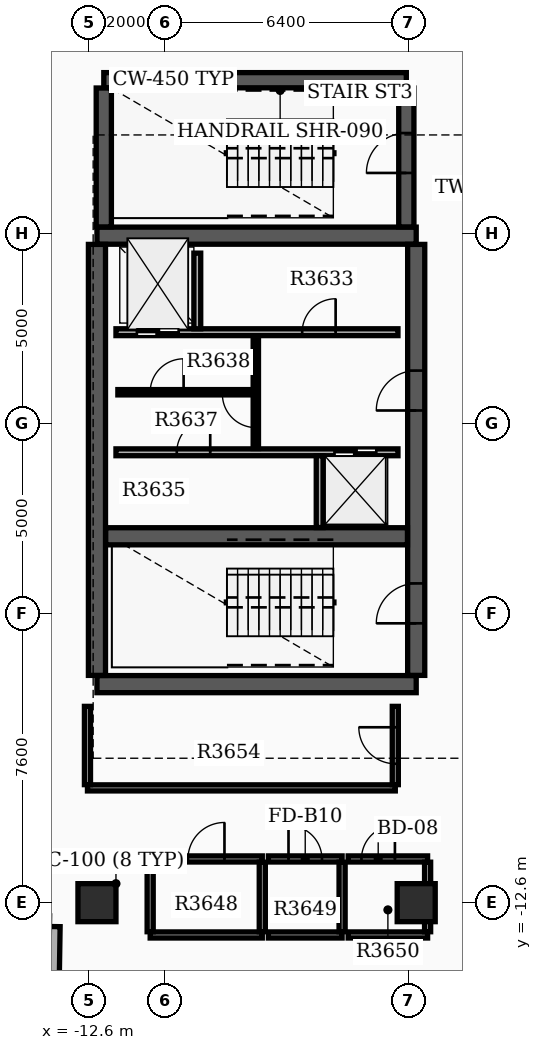
"""IFC4 building model, lengths in metres.
Left out: names, types, materials, properties, quantities, classifications, styles, units other than length and angle.
Written with IfcOpenShell. Run it as: python <this file> out.ifc"""

import sys

from ifc_helpers import new_model, si_unit, direction, frame, frame_2d, origin, origin_2d, place, context, subcontext, project, spatial, rectangle, extrude, element, fill, save


model = new_model("IFC4")
c1 = context("Model", 3, precision=1e-05, world=origin(), true_north=direction((0.0, 1.0)))
c2 = subcontext(c1, "Body", "Model", "MODEL_VIEW")
j1 = project(units=[si_unit("LENGTHUNIT", "METRE"), si_unit("PLANEANGLEUNIT", "RADIAN")], contexts=[c1])
p1 = place(None, origin())
s1 = spatial("IfcSite", under=j1, at=p1, CompositionType="ELEMENT")
p2 = place(p1, origin())
s2 = spatial("IfcBuilding", under=s1, at=p2, CompositionType="ELEMENT")
p3 = place(p2, frame((0.0, 0.0, 228.6)))
s3 = spatial("IfcBuildingStorey", under=s2, at=p3, CompositionType="ELEMENT", Elevation=228.6)
for number, where, z_axis, x_axis in (
    (1, (-12.4, -6.85, 0.0), (0.0, 0.0, 1.0), (1.0, 0.0, 0.0)),
    (2, (-12.4, 4.95, 0.0), (0.0, 0.0, 1.0), (1.0, 0.0, 0.0)),
):
    element("IfcWall", number, at=place(p3, frame(where, z_axis=z_axis, x_axis=x_axis)), inside=s3, PredefinedType="SHEAR", context=c2, shape_type="SweptSolid", body=[
        extrude(rectangle(XDim=8.4, YDim=0.45, at=frame_2d((4.2, 0.0))), origin(), (0.0, 0.0, 1.0), 3.7),
    ])
p4 = place(p3, frame((-12.4, -6.62, 0.0), z_axis=(0.0, 0.0, 1.0), x_axis=(0.0, 1.0, 0.0)))
e3 = element("IfcWall", 3, at=p4, inside=s3, PredefinedType="SHEAR", context=c2, shape_type="SweptSolid", body=[
    extrude(rectangle(XDim=11.34, YDim=0.45, at=frame_2d((5.67, 0.0))), origin(), (0.0, 0.0, 1.0), 3.7),
])
p5 = place(p3, frame((-4.0, -6.62, 0.0), z_axis=(0.0, 0.0, 1.0), x_axis=(0.0, 1.0, 0.0)))
e4 = element("IfcWall", 4, at=p5, inside=s3, PredefinedType="SHEAR", context=c2, shape_type="SweptSolid", body=[
    extrude(rectangle(XDim=11.34, YDim=0.45, at=frame_2d((5.67, 0.0))), origin(), (0.0, 0.0, 1.0), 3.7),
])
p6 = place(p5, frame((1.37, 0.0, 0.0)))
e5 = element("IfcOpeningElement", 5, at=p6, cuts=e4, PredefinedType="OPENING", context=c2, shape_type="SweptSolid", body=[
    extrude(rectangle(XDim=1.05, YDim=2.15, at=frame_2d((0.525, 1.075))), frame((0.0, 0.235, 0.0), z_axis=(0.0, -1.0, 0.0), x_axis=(1.0, 0.0, 0.0)), (0.0, 0.0, 1.0), 0.47),
])
p7 = place(p5, frame((6.97, 0.0, 0.0)))
e6 = element("IfcOpeningElement", 6, at=p7, cuts=e4, PredefinedType="OPENING", context=c2, shape_type="SweptSolid", body=[
    extrude(rectangle(XDim=1.05, YDim=2.15, at=frame_2d((0.525, 1.075))), frame((0.0, 0.235, 0.0), z_axis=(0.0, -1.0, 0.0), x_axis=(1.0, 0.0, 0.0)), (0.0, 0.0, 1.0), 0.47),
])
p8 = place(p3, frame((-12.17, -2.96, 0.0), z_axis=(0.0, 0.0, 1.0), x_axis=(1.0, 0.0, 0.0)))
e7 = element("IfcWall", 7, at=p8, inside=s3, PredefinedType="SHEAR", context=c2, shape_type="SweptSolid", body=[
    extrude(rectangle(XDim=7.94, YDim=0.45, at=frame_2d((3.97, 0.0))), origin(), (0.0, 0.0, 1.0), 3.7),
])
p9 = place(p3, frame((-12.22, 9.04, 0.0), z_axis=(0.0, 0.0, 1.0), x_axis=(1.0, 0.0, 0.0)))
e8 = element("IfcWall", 8, at=p9, inside=s3, PredefinedType="SHEAR", context=c2, shape_type="SweptSolid", body=[
    extrude(rectangle(XDim=7.96, YDim=0.4, at=frame_2d((3.98, 0.0))), origin(), (0.0, 0.0, 1.0), 3.7),
])
p10 = place(p3, frame((-12.22, 5.18, 0.0), z_axis=(0.0, 0.0, 1.0), x_axis=(0.0, 1.0, 0.0)))
e9 = element("IfcWall", 9, at=p10, inside=s3, PredefinedType="SHEAR", context=c2, shape_type="SweptSolid", body=[
    extrude(rectangle(XDim=3.655, YDim=0.4, at=frame_2d((1.828, 0.0))), origin(), (0.0, 0.0, 1.0), 3.7),
])
p11 = place(p3, frame((-4.26, 5.18, 0.0), z_axis=(0.0, 0.0, 1.0), x_axis=(0.0, 1.0, 0.0)))
e10 = element("IfcWall", 10, at=p11, inside=s3, PredefinedType="SHEAR", context=c2, shape_type="SweptSolid", body=[
    extrude(rectangle(XDim=3.655, YDim=0.4, at=frame_2d((1.828, 0.0))), origin(), (0.0, 0.0, 1.0), 3.7),
])
p12 = place(p11, frame((1.42, 0.0, 0.0)))
e11 = element("IfcOpeningElement", 11, at=p12, cuts=e10, PredefinedType="OPENING", context=c2, shape_type="SweptSolid", body=[
    extrude(rectangle(XDim=1.05, YDim=2.15, at=frame_2d((0.525, 1.075))), frame((0.0, 0.21, 0.0), z_axis=(0.0, -1.0, 0.0), x_axis=(1.0, 0.0, 0.0)), (0.0, 0.0, 1.0), 0.42),
])
for number, where, z_axis, x_axis in (
    (12, (-12.4, -12.6, 0.0), (0.0, 0.0, 1.0), (1.0, 0.0, 0.0)),
    (13, (-4.0, -12.6, 0.0), (0.0, 0.0, 1.0), (1.0, 0.0, 0.0)),
):
    element("IfcColumn", number, at=place(p3, frame(where, z_axis=z_axis, x_axis=x_axis)), inside=s3, PredefinedType="COLUMN", context=c2, shape_type="SweptSolid", body=[
        extrude(rectangle(XDim=1.0, YDim=1.0, at=origin_2d()), origin(), (0.0, 0.0, 1.0), 3.9),
    ])
p13 = place(p3, frame((-13.51, -13.229, 0.0), z_axis=(0.0, 0.0, 1.0), x_axis=(-0.015625635615, -0.999877912303, 0.0)))
e14 = element("IfcWall", 14, at=p13, inside=s3, PredefinedType="STANDARD", context=c2, shape_type="SweptSolid", body=[
    extrude(rectangle(XDim=1.5, YDim=0.28, at=frame_2d((0.75, 0.0))), origin(), (0.0, 0.0, 1.0), 3.18),
])
p14 = place(p3, frame((-11.9, 2.41, 0.0), z_axis=(0.0, 0.0, 1.0), x_axis=(1.0, 0.0, 0.0)))
e15 = element("IfcWall", 15, at=p14, inside=s3, PredefinedType="SOLIDWALL", context=c2, shape_type="SweptSolid", body=[
    extrude(rectangle(XDim=7.42, YDim=0.18, at=frame_2d((3.71, 0.0))), origin(), (0.0, 0.0, 1.0), 3.17),
])
p15 = place(p14, frame((0.55, 0.0, 0.0)))
e16 = element("IfcOpeningElement", 16, at=p15, cuts=e15, PredefinedType="OPENING", context=c2, shape_type="SweptSolid", body=[
    extrude(rectangle(XDim=1.1, YDim=2.15, at=frame_2d((0.55, 1.075))), frame((0.0, 0.1, 0.0), z_axis=(0.0, -1.0, 0.0), x_axis=(1.0, 0.0, 0.0)), (0.0, 0.0, 1.0), 0.2),
])
p16 = place(p14, frame((4.9, 0.0, 0.0)))
e17 = element("IfcOpeningElement", 17, at=p16, cuts=e15, PredefinedType="OPENING", context=c2, shape_type="SweptSolid", body=[
    extrude(rectangle(XDim=0.88, YDim=2.1, at=frame_2d((0.44, 1.05))), frame((0.0, 0.1, 0.0), z_axis=(0.0, -1.0, 0.0), x_axis=(1.0, 0.0, 0.0)), (0.0, 0.0, 1.0), 0.2),
])
p17 = place(p3, frame((-11.9, -0.75, 0.0), z_axis=(0.0, 0.0, 1.0), x_axis=(1.0, 0.0, 0.0)))
e18 = element("IfcWall", 18, at=p17, inside=s3, PredefinedType="SOLIDWALL", context=c2, shape_type="SweptSolid", body=[
    extrude(rectangle(XDim=7.42, YDim=0.18, at=frame_2d((3.71, 0.0))), origin(), (0.0, 0.0, 1.0), 3.17),
])
p18 = place(p17, frame((5.75, 0.0, 0.0)))
e19 = element("IfcOpeningElement", 19, at=p18, cuts=e18, PredefinedType="OPENING", context=c2, shape_type="SweptSolid", body=[
    extrude(rectangle(XDim=1.1, YDim=2.15, at=frame_2d((0.55, 1.075))), frame((0.0, 0.1, 0.0), z_axis=(0.0, -1.0, 0.0), x_axis=(1.0, 0.0, 0.0)), (0.0, 0.0, 1.0), 0.2),
])
p19 = place(p17, frame((1.6, 0.0, 0.0)))
e20 = element("IfcOpeningElement", 20, at=p19, cuts=e18, PredefinedType="OPENING", context=c2, shape_type="SweptSolid", body=[
    extrude(rectangle(XDim=0.88, YDim=2.1, at=frame_2d((0.44, 1.05))), frame((0.0, 0.1, 0.0), z_axis=(0.0, -1.0, 0.0), x_axis=(1.0, 0.0, 0.0)), (0.0, 0.0, 1.0), 0.2),
])
p20 = place(p3, frame((-9.76, 2.5, 0.0), z_axis=(0.0, 0.0, 1.0), x_axis=(0.0, 1.0, 0.0)))
e21 = element("IfcWall", 21, at=p20, inside=s3, PredefinedType="SOLIDWALL", context=c2, shape_type="SweptSolid", body=[
    extrude(rectangle(XDim=1.99, YDim=0.18, at=frame_2d((0.995, 0.0))), origin(), (0.0, 0.0, 1.0), 3.17),
])
p21 = place(p3, frame((-6.54, -2.73, 0.0), z_axis=(0.0, 0.0, 1.0), x_axis=(0.0, 1.0, 0.0)))
e22 = element("IfcWall", 22, at=p21, inside=s3, PredefinedType="SOLIDWALL", context=c2, shape_type="SweptSolid", body=[
    extrude(rectangle(XDim=1.89, YDim=0.18, at=frame_2d((0.945, 0.0))), origin(), (0.0, 0.0, 1.0), 3.17),
])
p22 = place(p3, frame((-8.22, -0.65, 0.0), z_axis=(0.0, 0.0, 1.0), x_axis=(0.0, 1.0, 0.0)))
e23 = element("IfcWall", 23, at=p22, inside=s3, PredefinedType="SOLIDWALL", context=c2, shape_type="SweptSolid", body=[
    extrude(rectangle(XDim=2.96, YDim=0.14, at=frame_2d((1.48, 0.0))), origin(), (0.0, 0.0, 1.0), 3.17),
])
p23 = place(p22, frame((0.55, 0.0, 0.0)))
e24 = element("IfcOpeningElement", 24, at=p23, cuts=e23, PredefinedType="OPENING", context=c2, shape_type="SweptSolid", body=[
    extrude(rectangle(XDim=0.88, YDim=2.1, at=frame_2d((0.44, 1.05))), frame((0.0, 0.08, 0.0), z_axis=(0.0, -1.0, 0.0), x_axis=(1.0, 0.0, 0.0)), (0.0, 0.0, 1.0), 0.16),
])
p24 = place(p3, frame((-11.85, 0.83, 0.0), z_axis=(0.0, 0.0, 1.0), x_axis=(1.0, 0.0, 0.0)))
e25 = element("IfcWall", 25, at=p24, inside=s3, PredefinedType="PARTITIONING", context=c2, shape_type="SweptSolid", body=[
    extrude(rectangle(XDim=3.552, YDim=0.14, at=frame_2d((1.776, 0.0))), origin(), (0.0, 0.0, 1.0), 3.17),
])
p25 = place(p24, frame((0.85, 0.0, 0.0)))
e26 = element("IfcOpeningElement", 26, at=p25, cuts=e25, PredefinedType="OPENING", context=c2, shape_type="SweptSolid", body=[
    extrude(rectangle(XDim=0.88, YDim=2.1, at=frame_2d((0.44, 1.05))), frame((0.0, 0.08, 0.0), z_axis=(0.0, -1.0, 0.0), x_axis=(1.0, 0.0, 0.0)), (0.0, 0.0, 1.0), 0.16),
])
p26 = place(p3, frame((-11.0, -13.45, 0.0), z_axis=(0.0, 0.0, 1.0), x_axis=(1.0, 0.0, 0.0)))
e27 = element("IfcWall", 27, at=p26, inside=s3, PredefinedType="PARTITIONING", context=c2, shape_type="SweptSolid", body=[
    extrude(rectangle(XDim=2.95, YDim=0.16, at=frame_2d((1.475, 0.0))), origin(), (0.0, 0.0, 1.0), 3.17),
])
p27 = place(p3, frame((-11.0, -11.45, 0.0), z_axis=(0.0, 0.0, 1.0), x_axis=(1.0, 0.0, 0.0)))
e28 = element("IfcWall", 28, at=p27, inside=s3, PredefinedType="PARTITIONING", context=c2, shape_type="SweptSolid", body=[
    extrude(rectangle(XDim=2.95, YDim=0.16, at=frame_2d((1.475, 0.0))), origin(), (0.0, 0.0, 1.0), 3.17),
])
p28 = place(p27, frame((0.995, 0.0, 0.0)))
e29 = element("IfcOpeningElement", 29, at=p28, cuts=e28, PredefinedType="OPENING", context=c2, shape_type="SweptSolid", body=[
    extrude(rectangle(XDim=0.96, YDim=2.15, at=frame_2d((0.48, 1.075))), frame((0.0, 0.09, 0.0), z_axis=(0.0, -1.0, 0.0), x_axis=(1.0, 0.0, 0.0)), (0.0, 0.0, 1.0), 0.18),
])
for number, where, z_axis, x_axis in (
    (30, (-11.0, -13.365, 0.0), (0.0, 0.0, 1.0), (0.0, 1.0, 0.0)),
    (31, (-8.05, -13.365, 0.0), (0.0, 0.0, 1.0), (0.0, 1.0, 0.0)),
):
    element("IfcWall", number, at=place(p3, frame(where, z_axis=z_axis, x_axis=x_axis)), inside=s3, PredefinedType="PARTITIONING", context=c2, shape_type="SweptSolid", body=[
        extrude(rectangle(XDim=1.83, YDim=0.16, at=frame_2d((0.915, 0.0))), origin(), (0.0, 0.0, 1.0), 3.17),
    ])
p29 = place(p3, frame((-7.89, -13.45, 0.0), z_axis=(0.0, 0.0, 1.0), x_axis=(1.0, 0.0, 0.0)))
e32 = element("IfcWall", 32, at=p29, inside=s3, PredefinedType="PARTITIONING", context=c2, shape_type="SweptSolid", body=[
    extrude(rectangle(XDim=1.94, YDim=0.16, at=frame_2d((0.97, 0.0))), origin(), (0.0, 0.0, 1.0), 3.17),
])
p30 = place(p3, frame((-7.89, -11.45, 0.0), z_axis=(0.0, 0.0, 1.0), x_axis=(1.0, 0.0, 0.0)))
e33 = element("IfcWall", 33, at=p30, inside=s3, PredefinedType="PARTITIONING", context=c2, shape_type="SweptSolid", body=[
    extrude(rectangle(XDim=1.94, YDim=0.16, at=frame_2d((0.97, 0.0))), origin(), (0.0, 0.0, 1.0), 3.17),
])
p31 = place(p30, frame((0.53, 0.0, 0.0)))
e34 = element("IfcOpeningElement", 34, at=p31, cuts=e33, PredefinedType="OPENING", context=c2, shape_type="SweptSolid", body=[
    extrude(rectangle(XDim=0.88, YDim=2.1, at=frame_2d((0.44, 1.05))), frame((0.0, 0.09, 0.0), z_axis=(0.0, -1.0, 0.0), x_axis=(1.0, 0.0, 0.0)), (0.0, 0.0, 1.0), 0.18),
])
p32 = place(p3, frame((-5.95, -13.365, 0.0), z_axis=(0.0, 0.0, 1.0), x_axis=(0.0, 1.0, 0.0)))
e35 = element("IfcWall", 35, at=p32, inside=s3, PredefinedType="PARTITIONING", context=c2, shape_type="SweptSolid", body=[
    extrude(rectangle(XDim=1.83, YDim=0.16, at=frame_2d((0.915, 0.0))), origin(), (0.0, 0.0, 1.0), 3.17),
])
p33 = place(p3, frame((-5.79, -13.45, 0.0), z_axis=(0.0, 0.0, 1.0), x_axis=(1.0, 0.0, 0.0)))
e36 = element("IfcWall", 36, at=p33, inside=s3, PredefinedType="PARTITIONING", context=c2, shape_type="SweptSolid", body=[
    extrude(rectangle(XDim=2.09, YDim=0.16, at=frame_2d((1.045, 0.0))), origin(), (0.0, 0.0, 1.0), 3.17),
])
p34 = place(p3, frame((-5.79, -11.45, 0.0), z_axis=(0.0, 0.0, 1.0), x_axis=(1.0, 0.0, 0.0)))
e37 = element("IfcWall", 37, at=p34, inside=s3, PredefinedType="PARTITIONING", context=c2, shape_type="SweptSolid", body=[
    extrude(rectangle(XDim=2.09, YDim=0.16, at=frame_2d((1.045, 0.0))), origin(), (0.0, 0.0, 1.0), 3.17),
])
p35 = place(p34, frame((0.35, 0.0, 0.0)))
e38 = element("IfcOpeningElement", 38, at=p35, cuts=e37, PredefinedType="OPENING", context=c2, shape_type="SweptSolid", body=[
    extrude(rectangle(XDim=0.88, YDim=2.15, at=frame_2d((0.44, 1.075))), frame((0.0, 0.09, 0.0), z_axis=(0.0, -1.0, 0.0), x_axis=(1.0, 0.0, 0.0)), (0.0, 0.0, 1.0), 0.18),
])
p36 = place(p3, frame((-3.7, -13.365, 0.0), z_axis=(0.0, 0.0, 1.0), x_axis=(0.0, 1.0, 0.0)))
e39 = element("IfcWall", 39, at=p36, inside=s3, PredefinedType="PARTITIONING", context=c2, shape_type="SweptSolid", body=[
    extrude(rectangle(XDim=1.83, YDim=0.16, at=frame_2d((0.915, 0.0))), origin(), (0.0, 0.0, 1.0), 3.17),
])
p37 = place(p3, frame((-12.65, -9.58, 0.0), z_axis=(0.0, 0.0, 1.0), x_axis=(1.0, 0.0, 0.0)))
e40 = element("IfcWall", 40, at=p37, inside=s3, PredefinedType="PARTITIONING", context=c2, shape_type="SweptSolid", body=[
    extrude(rectangle(XDim=8.1, YDim=0.16, at=frame_2d((4.05, 0.0))), origin(), (0.0, 0.0, 1.0), 3.17),
])
p38 = place(p3, frame((-12.65, -9.495, 0.0), z_axis=(0.0, 0.0, 1.0), x_axis=(0.0, 1.0, 0.0)))
e41 = element("IfcWall", 41, at=p38, inside=s3, PredefinedType="PARTITIONING", context=c2, shape_type="SweptSolid", body=[
    extrude(rectangle(XDim=2.06, YDim=0.16, at=frame_2d((1.03, 0.0))), origin(), (0.0, 0.0, 1.0), 3.17),
])
p39 = place(p3, frame((-4.55, -9.495, 0.0), z_axis=(0.0, 0.0, 1.0), x_axis=(0.0, 1.0, 0.0)))
e42 = element("IfcWall", 42, at=p39, inside=s3, PredefinedType="PARTITIONING", context=c2, shape_type="SweptSolid", body=[
    extrude(rectangle(XDim=2.06, YDim=0.16, at=frame_2d((1.03, 0.0))), origin(), (0.0, 0.0, 1.0), 3.17),
])
p40 = place(p39, frame((0.55, 0.0, 0.0)))
e43 = element("IfcOpeningElement", 43, at=p40, cuts=e42, PredefinedType="OPENING", context=c2, shape_type="SweptSolid", body=[
    extrude(rectangle(XDim=0.96, YDim=2.15, at=frame_2d((0.48, 1.075))), frame((0.0, 0.09, 0.0), z_axis=(0.0, -1.0, 0.0), x_axis=(1.0, 0.0, 0.0)), (0.0, 0.0, 1.0), 0.18),
])
p41 = place(p6, origin())
e44 = element("IfcDoor", 44, at=p41, inside=s3, OperationType="SINGLE_SWING_LEFT", PredefinedType="DOOR", context=c2, shape_type="SweptSolid", body=[
    extrude(rectangle(XDim=1.05, YDim=2.15, at=frame_2d((0.525, 1.075))), frame((0.0, 0.025, 0.0), z_axis=(0.0, -1.0, 0.0), x_axis=(1.0, 0.0, 0.0)), (0.0, 0.0, 1.0), 0.05),
])
fill(e5, e44)
p42 = place(p7, origin())
e45 = element("IfcDoor", 45, at=p42, inside=s3, OperationType="SINGLE_SWING_LEFT", PredefinedType="DOOR", context=c2, shape_type="SweptSolid", body=[
    extrude(rectangle(XDim=1.05, YDim=2.15, at=frame_2d((0.525, 1.075))), frame((0.0, 0.025, 0.0), z_axis=(0.0, -1.0, 0.0), x_axis=(1.0, 0.0, 0.0)), (0.0, 0.0, 1.0), 0.05),
])
fill(e6, e45)
p43 = place(p12, origin())
e46 = element("IfcDoor", 46, at=p43, inside=s3, OperationType="SINGLE_SWING_LEFT", PredefinedType="DOOR", context=c2, shape_type="SweptSolid", body=[
    extrude(rectangle(XDim=1.05, YDim=2.15, at=frame_2d((0.525, 1.075))), frame((0.0, 0.025, 0.0), z_axis=(0.0, -1.0, 0.0), x_axis=(1.0, 0.0, 0.0)), (0.0, 0.0, 1.0), 0.05),
])
fill(e11, e46)
p44 = place(p15, origin())
e47 = element("IfcDoor", 47, at=p44, inside=s3, OperationType="DOUBLE_DOOR_SLIDING", PredefinedType="DOOR", context=c2, shape_type="SweptSolid", body=[
    extrude(rectangle(XDim=1.1, YDim=2.15, at=frame_2d((0.55, 1.075))), frame((0.0, 0.025, 0.0), z_axis=(0.0, -1.0, 0.0), x_axis=(1.0, 0.0, 0.0)), (0.0, 0.0, 1.0), 0.05),
])
fill(e16, e47)
p45 = place(p18, origin())
e48 = element("IfcDoor", 48, at=p45, inside=s3, OperationType="DOUBLE_DOOR_SLIDING", PredefinedType="DOOR", context=c2, shape_type="SweptSolid", body=[
    extrude(rectangle(XDim=1.1, YDim=2.15, at=frame_2d((0.55, 1.075))), frame((0.0, 0.025, 0.0), z_axis=(0.0, -1.0, 0.0), x_axis=(1.0, 0.0, 0.0)), (0.0, 0.0, 1.0), 0.05),
])
fill(e19, e48)
p46 = place(p16, origin())
e49 = element("IfcDoor", 49, at=p46, inside=s3, OperationType="SINGLE_SWING_RIGHT", PredefinedType="DOOR", context=c2, shape_type="SweptSolid", body=[
    extrude(rectangle(XDim=0.88, YDim=2.1, at=frame_2d((0.44, 1.05))), frame((0.0, 0.025, 0.0), z_axis=(0.0, -1.0, 0.0), x_axis=(1.0, 0.0, 0.0)), (0.0, 0.0, 1.0), 0.05),
])
fill(e17, e49)
p47 = place(p19, origin())
e50 = element("IfcDoor", 50, at=p47, inside=s3, OperationType="SINGLE_SWING_RIGHT", PredefinedType="DOOR", context=c2, shape_type="SweptSolid", body=[
    extrude(rectangle(XDim=0.88, YDim=2.1, at=frame_2d((0.44, 1.05))), frame((0.0, 0.025, 0.0), z_axis=(0.0, -1.0, 0.0), x_axis=(1.0, 0.0, 0.0)), (0.0, 0.0, 1.0), 0.05),
])
fill(e20, e50)
p48 = place(p23, origin())
e51 = element("IfcDoor", 51, at=p48, inside=s3, OperationType="SINGLE_SWING_RIGHT", PredefinedType="DOOR", context=c2, shape_type="SweptSolid", body=[
    extrude(rectangle(XDim=0.88, YDim=2.1, at=frame_2d((0.44, 1.05))), frame((0.0, 0.025, 0.0), z_axis=(0.0, -1.0, 0.0), x_axis=(1.0, 0.0, 0.0)), (0.0, 0.0, 1.0), 0.05),
])
fill(e24, e51)
p49 = place(p25, origin())
e52 = element("IfcDoor", 52, at=p49, inside=s3, OperationType="SINGLE_SWING_RIGHT", PredefinedType="DOOR", context=c2, shape_type="SweptSolid", body=[
    extrude(rectangle(XDim=0.88, YDim=2.1, at=frame_2d((0.44, 1.05))), frame((0.0, 0.025, 0.0), z_axis=(0.0, -1.0, 0.0), x_axis=(1.0, 0.0, 0.0)), (0.0, 0.0, 1.0), 0.05),
])
fill(e26, e52)
p50 = place(p28, origin())
e53 = element("IfcDoor", 53, at=p50, inside=s3, OperationType="SINGLE_SWING_RIGHT", PredefinedType="DOOR", context=c2, shape_type="SweptSolid", body=[
    extrude(rectangle(XDim=0.96, YDim=2.15, at=frame_2d((0.48, 1.075))), frame((0.0, 0.025, 0.0), z_axis=(0.0, -1.0, 0.0), x_axis=(1.0, 0.0, 0.0)), (0.0, 0.0, 1.0), 0.05),
])
fill(e29, e53)
p51 = place(p31, origin())
e54 = element("IfcDoor", 54, at=p51, inside=s3, OperationType="SINGLE_SWING_LEFT", PredefinedType="DOOR", context=c2, shape_type="SweptSolid", body=[
    extrude(rectangle(XDim=0.88, YDim=2.1, at=frame_2d((0.44, 1.05))), frame((0.0, 0.025, 0.0), z_axis=(0.0, -1.0, 0.0), x_axis=(1.0, 0.0, 0.0)), (0.0, 0.0, 1.0), 0.05),
])
fill(e34, e54)
p52 = place(p35, origin())
e55 = element("IfcDoor", 55, at=p52, inside=s3, OperationType="SINGLE_SWING_RIGHT", PredefinedType="DOOR", context=c2, shape_type="SweptSolid", body=[
    extrude(rectangle(XDim=0.88, YDim=2.15, at=frame_2d((0.44, 1.075))), frame((0.0, 0.025, 0.0), z_axis=(0.0, -1.0, 0.0), x_axis=(1.0, 0.0, 0.0)), (0.0, 0.0, 1.0), 0.05),
])
fill(e38, e55)
p53 = place(p40, origin())
e56 = element("IfcDoor", 56, at=p53, inside=s3, OperationType="SINGLE_SWING_RIGHT", PredefinedType="DOOR", context=c2, shape_type="SweptSolid", body=[
    extrude(rectangle(XDim=0.96, YDim=2.15, at=frame_2d((0.48, 1.075))), frame((0.0, 0.025, 0.0), z_axis=(0.0, -1.0, 0.0), x_axis=(1.0, 0.0, 0.0)), (0.0, 0.0, 1.0), 0.05),
])
fill(e43, e56)
save(model, sys.argv[1])
